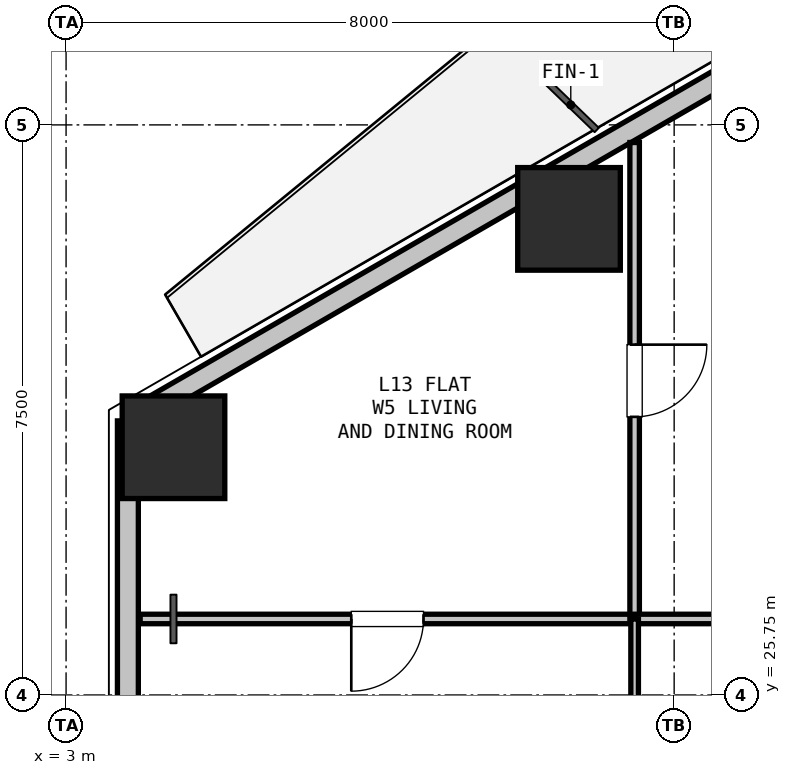
"""IFC4 building model, lengths in metres.
Left out: names, types, materials, properties, quantities, classifications, styles, units other than length and angle.
Written with IfcOpenShell. Run it as: python <this file> out.ifc"""

import sys

from ifc_helpers import new_model, si_unit, direction, frame, frame_2d, origin, origin_2d, place, context, subcontext, project, spatial, rectangle, hollow_rectangle, extrude, element, fill, save


model = new_model("IFC4")
c1 = context("Model", 3, precision=1e-05, world=origin(), true_north=direction((0.0, 1.0)))
c2 = subcontext(c1, "Body", "Model", "MODEL_VIEW")
j1 = project(units=[si_unit("LENGTHUNIT", "METRE"), si_unit("PLANEANGLEUNIT", "RADIAN")], contexts=[c1])
p1 = place(None, origin())
s1 = spatial("IfcSite", under=j1, at=p1, CompositionType="ELEMENT")
p2 = place(p1, origin())
s2 = spatial("IfcBuilding", under=s1, at=p2, CompositionType="ELEMENT")
p3 = place(p2, frame((0.0, 0.0, 48.9)))
s3 = spatial("IfcBuildingStorey", under=s2, at=p3, CompositionType="ELEMENT", Elevation=48.9)
for number, where, z_axis, x_axis in (
    (1, (4.413, 29.009, 0.0), (0.0, 0.0, 1.0), (1.0, 0.0, 0.0)),
    (2, (9.617, 32.014, 0.0), (0.0, 0.0, 1.0), (1.0, 0.0, 0.0)),
):
    element("IfcColumn", number, at=place(p3, frame(where, z_axis=z_axis, x_axis=x_axis)), inside=s3, PredefinedType="COLUMN", context=c2, shape_type="SweptSolid", body=[
        extrude(hollow_rectangle(XDim=1.35, YDim=1.35, WallThickness=0.036, at=origin_2d()), origin(), (0.0, 0.0, 1.0), 3.3),
    ])
p4 = place(p3, frame((3.813, 24.144, 0.0), z_axis=(0.0, 0.0, 1.0), x_axis=(0.0, 1.0, 0.0)))
e3 = element("IfcWall", 3, at=p4, inside=s3, PredefinedType="SOLIDWALL", context=c2, shape_type="SweptSolid", body=[
    extrude(rectangle(XDim=5.211, YDim=0.275, at=frame_2d((2.606, 0.0))), origin(), (0.0, 0.0, 1.0), 2.66),
])
p5 = place(p3, frame((3.943, 29.431, 0.0), z_axis=(0.0, 0.0, 1.0), x_axis=(0.866027105532, 0.499997052475, 0.0)))
e4 = element("IfcWall", 4, at=p5, inside=s3, PredefinedType="SOLIDWALL", context=c2, shape_type="SweptSolid", body=[
    extrude(rectangle(XDim=12.673, YDim=0.275, at=frame_2d((6.336, 0.0))), origin(), (0.0, 0.0, 1.0), 2.66),
])
p6 = place(p5, frame((9.298, 0.0, 0.0)))
e5 = element("IfcOpeningElement", 5, at=p6, cuts=e4, PredefinedType="OPENING", context=c2, shape_type="SweptSolid", body=[
    extrude(rectangle(XDim=1.0, YDim=2.1, at=frame_2d((0.5, 1.05))), frame((0.0, 0.147, 0.0), z_axis=(0.0, -1.0, 0.0), x_axis=(1.0, 0.0, 0.0)), (0.0, 0.0, 1.0), 0.295),
])
p7 = place(p3, frame((10.48, 26.75, 0.0), z_axis=(0.0, 0.0, 1.0), x_axis=(-1.0, 0.0, 0.0)))
e6 = element("IfcWall", 6, at=p7, inside=s3, PredefinedType="PARTITIONING", context=c2, shape_type="SweptSolid", body=[
    extrude(rectangle(XDim=6.505, YDim=0.125, at=frame_2d((3.253, 0.0))), origin(), (0.0, 0.0, 1.0), 2.65),
])
p8 = place(p7, frame((2.778, 0.0, 0.0)))
e7 = element("IfcOpeningElement", 7, at=p8, cuts=e6, PredefinedType="OPENING", context=c2, shape_type="SweptSolid", body=[
    extrude(rectangle(XDim=0.95, YDim=2.1, at=frame_2d((0.475, 1.05))), frame((0.0, 0.073, 0.0), z_axis=(0.0, -1.0, 0.0), x_axis=(1.0, 0.0, 0.0)), (0.0, 0.0, 1.0), 0.145),
])
p9 = place(p3, frame((3.813, 29.356, 0.0), z_axis=(0.0, 0.0, 1.0), x_axis=(0.866131372301, 0.499816412211, 0.0)))
e8 = element("IfcWall", 8, at=p9, inside=s3, PredefinedType="PARTITIONING", context=c2, shape_type="SweptSolid", body=[
    extrude(rectangle(XDim=0.15, YDim=0.1, at=frame_2d((0.075, 0.0))), origin(), (0.0, 0.0, 1.0), 3.04),
])
p10 = place(p3, frame((10.48, 33.018, 0.0), z_axis=(0.0, 0.0, 1.0), x_axis=(0.0, -1.0, 0.0)))
e9 = element("IfcWall", 9, at=p10, inside=s3, PredefinedType="PARTITIONING", context=c2, shape_type="SweptSolid", body=[
    extrude(rectangle(XDim=6.268, YDim=0.125, at=frame_2d((3.134, 0.0))), origin(), (0.0, 0.0, 1.0), 2.338),
])
p11 = place(p10, frame((2.659, 0.0, 0.0)))
e10 = element("IfcOpeningElement", 10, at=p11, cuts=e9, PredefinedType="OPENING", context=c2, shape_type="SweptSolid", body=[
    extrude(rectangle(XDim=0.95, YDim=2.1, at=frame_2d((0.475, 1.05))), frame((0.0, 0.073, 0.0), z_axis=(0.0, -1.0, 0.0), x_axis=(1.0, 0.0, 0.0)), (0.0, 0.0, 1.0), 0.145),
])
p12 = place(p3, frame((17.15, 26.75, 0.0), z_axis=(0.0, 0.0, 1.0), x_axis=(-1.0, 0.0, 0.0)))
e11 = element("IfcWall", 11, at=p12, inside=s3, PredefinedType="PARTITIONING", context=c2, shape_type="SweptSolid", body=[
    extrude(rectangle(XDim=6.67, YDim=0.125, at=frame_2d((3.335, 0.0))), origin(), (0.0, 0.0, 1.0), 3.04),
])
p13 = place(p12, frame((2.86, 0.0, 0.0)))
e12 = element("IfcOpeningElement", 12, at=p13, cuts=e11, PredefinedType="OPENING", context=c2, shape_type="SweptSolid", body=[
    extrude(rectangle(XDim=0.95, YDim=2.1, at=frame_2d((0.475, 1.05))), frame((0.0, 0.073, 0.0), z_axis=(0.0, -1.0, 0.0), x_axis=(1.0, 0.0, 0.0)), (0.0, 0.0, 1.0), 0.145),
])
p14 = place(p3, frame((10.48, 26.75, 0.0), z_axis=(0.0, 0.0, 1.0), x_axis=(0.0, -1.0, 0.0)))
e13 = element("IfcWall", 13, at=p14, inside=s3, PredefinedType="PARTITIONING", context=c2, shape_type="SweptSolid", body=[
    extrude(rectangle(XDim=6.268, YDim=0.1, at=frame_2d((3.134, 0.0))), origin(), (0.0, 0.0, 1.0), 2.338),
])
p15 = place(p14, frame((2.659, 0.0, 0.0)))
e14 = element("IfcOpeningElement", 14, at=p15, cuts=e13, PredefinedType="OPENING", context=c2, shape_type="SweptSolid", body=[
    extrude(rectangle(XDim=0.95, YDim=2.1, at=frame_2d((0.475, 1.05))), frame((0.0, 0.06, 0.0), z_axis=(0.0, -1.0, 0.0), x_axis=(1.0, 0.0, 0.0)), (0.0, 0.0, 1.0), 0.12),
])
p16 = place(p11, origin())
e15 = element("IfcDoor", 15, at=p16, inside=s3, OperationType="SINGLE_SWING_LEFT", PredefinedType="DOOR", context=c2, shape_type="SweptSolid", body=[
    extrude(rectangle(XDim=0.95, YDim=2.1, at=frame_2d((0.475, 1.05))), frame((0.0, 0.025, 0.0), z_axis=(0.0, -1.0, 0.0), x_axis=(1.0, 0.0, 0.0)), (0.0, 0.0, 1.0), 0.05),
])
fill(e10, e15)
p17 = place(p8, origin())
e16 = element("IfcDoor", 16, at=p17, inside=s3, OperationType="SINGLE_SWING_RIGHT", PredefinedType="DOOR", context=c2, shape_type="SweptSolid", body=[
    extrude(rectangle(XDim=0.95, YDim=2.1, at=frame_2d((0.475, 1.05))), frame((0.0, 0.025, 0.0), z_axis=(0.0, -1.0, 0.0), x_axis=(1.0, 0.0, 0.0)), (0.0, 0.0, 1.0), 0.05),
])
fill(e7, e16)
save(model, sys.argv[1])
